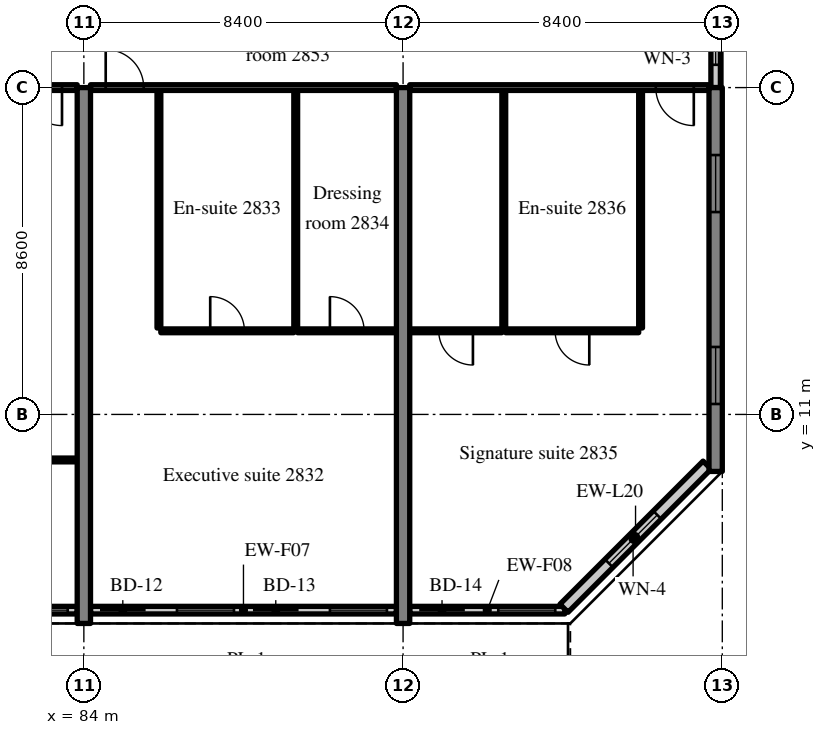
"""IFC4 building model, lengths in metres.
Left out: names, types, materials, properties, quantities, classifications, styles, units other than length and angle.
Written with IfcOpenShell. Run it as: python <this file> out.ifc"""

import sys

from ifc_helpers import new_model, si_unit, direction, frame, frame_2d, origin, place, context, subcontext, project, spatial, rectangle, extrude, source, transform, mapped, element, fill, save


model = new_model("IFC4")
c1 = context("Model", 3, precision=1e-05, world=origin(), true_north=direction((0.0, 1.0)))
c2 = subcontext(c1, "Body", "Model", "MODEL_VIEW")
j1 = project(units=[si_unit("LENGTHUNIT", "METRE"), si_unit("PLANEANGLEUNIT", "RADIAN")], contexts=[c1])
p1 = place(None, origin())
s1 = spatial("IfcSite", under=j1, at=p1, CompositionType="ELEMENT")
p2 = place(p1, origin())
s2 = spatial("IfcBuilding", under=s1, at=p2, CompositionType="ELEMENT")
p3 = place(p2, frame((0.0, 0.0, 118.0)))
s3 = spatial("IfcBuildingStorey", under=s2, at=p3, CompositionType="ELEMENT", Elevation=118.0)
m1 = source(origin(), c2, "Body", "SweptSolid", [
    extrude(rectangle(XDim=14.1, YDim=0.35, at=frame_2d((7.05, 0.0))), origin(), (0.0, 0.0, 1.0), 3.52),
])
for number, where, z_axis, x_axis in (
    (1, (84.0, 5.5, 0.0), (0.0, 0.0, 1.0), (0.0, 1.0, 0.0)),
    (2, (92.4, 5.5, 0.0), (0.0, 0.0, 1.0), (0.0, 1.0, 0.0)),
):
    element("IfcWall", number, at=place(p3, frame(where, z_axis=z_axis, x_axis=x_axis)), inside=s3, PredefinedType="SHEAR", context=c2, shape_type="MappedRepresentation", body=[
        mapped(m1, transform((0.0, 0.0, 0.0), scale=1.0)),
    ])
m2 = source(origin(), c2, "Body", "SweptSolid", [
    extrude(rectangle(XDim=10.1, YDim=0.35, at=frame_2d((5.05, 0.0))), origin(), (0.0, 0.0, 1.0), 3.52),
])
p4 = place(p3, frame((100.625, 9.5, 0.0), z_axis=(0.0, 0.0, 1.0), x_axis=(0.0, 1.0, 0.0)))
e3 = element("IfcWall", 3, at=p4, inside=s3, PredefinedType="SHEAR", context=c2, shape_type="MappedRepresentation", body=[
    mapped(m2, transform((0.0, 0.0, 0.0), scale=1.0)),
])
m3 = source(origin(), c2, "Body", "SweptSolid", [
    extrude(rectangle(XDim=1.5, YDim=1.5, at=frame_2d((0.75, 0.75))), frame((0.0, 0.185, 0.0), z_axis=(0.0, -1.0, 0.0), x_axis=(1.0, 0.0, 0.0)), (0.0, 0.0, 1.0), 0.37),
])
p5 = place(p4, frame((1.775, 0.0, 0.9)))
e4 = element("IfcOpeningElement", 4, at=p5, cuts=e3, PredefinedType="OPENING", context=c2, shape_type="MappedRepresentation", body=[
    mapped(m3, transform((0.0, 0.0, 0.0), scale=1.0)),
])
p6 = place(p4, frame((6.825, 0.0, 0.9)))
e5 = element("IfcOpeningElement", 5, at=p6, cuts=e3, PredefinedType="OPENING", context=c2, shape_type="MappedRepresentation", body=[
    mapped(m3, transform((0.0, 0.0, 0.0), scale=1.0)),
])
m4 = source(origin(), c2, "Body", "SweptSolid", [
    extrude(rectangle(XDim=8.05, YDim=0.2, at=frame_2d((4.025, 0.0))), origin(), (0.0, 0.0, 1.0), 2.82),
])
p7 = place(p3, frame((75.775, 5.85, 0.0), z_axis=(0.0, 0.0, 1.0), x_axis=(1.0, 0.0, 0.0)))
e6 = element("IfcWall", 6, at=p7, inside=s3, PredefinedType="SOLIDWALL", context=c2, shape_type="MappedRepresentation", body=[
    mapped(m4, transform((0.0, 0.0, 0.0), scale=1.0)),
])
m5 = source(origin(), c2, "Body", "SweptSolid", [
    extrude(rectangle(XDim=1.2, YDim=2.4, at=frame_2d((0.6, 1.2))), frame((0.0, 0.11, 0.0), z_axis=(0.0, -1.0, 0.0), x_axis=(1.0, 0.0, 0.0)), (0.0, 0.0, 1.0), 0.22),
])
p8 = place(p7, frame((0.25, 0.0, 0.0)))
e7 = element("IfcOpeningElement", 7, at=p8, cuts=e6, PredefinedType="OPENING", context=c2, shape_type="MappedRepresentation", body=[
    mapped(m5, transform((0.0, 0.0, 0.0), scale=1.0)),
])
m6 = source(origin(), c2, "Body", "SweptSolid", [
    extrude(rectangle(XDim=1.5, YDim=1.5, at=frame_2d((0.75, 0.75))), frame((0.0, 0.11, 0.0), z_axis=(0.0, -1.0, 0.0), x_axis=(1.0, 0.0, 0.0)), (0.0, 0.0, 1.0), 0.22),
])
p9 = place(p7, frame((2.275, 0.0, 0.9)))
e8 = element("IfcOpeningElement", 8, at=p9, cuts=e6, PredefinedType="OPENING", context=c2, shape_type="MappedRepresentation", body=[
    mapped(m6, transform((0.0, 0.0, 0.0), scale=1.0)),
])
p10 = place(p7, frame((4.275, 0.0, 0.0)))
e9 = element("IfcOpeningElement", 9, at=p10, cuts=e6, PredefinedType="OPENING", context=c2, shape_type="MappedRepresentation", body=[
    mapped(m5, transform((0.0, 0.0, 0.0), scale=1.0)),
])
p11 = place(p7, frame((6.3, 0.0, 0.9)))
e10 = element("IfcOpeningElement", 10, at=p11, cuts=e6, PredefinedType="OPENING", context=c2, shape_type="MappedRepresentation", body=[
    mapped(m6, transform((0.0, 0.0, 0.0), scale=1.0)),
])
p12 = place(p3, frame((84.175, 5.85, 0.0), z_axis=(0.0, 0.0, 1.0), x_axis=(1.0, 0.0, 0.0)))
e11 = element("IfcWall", 11, at=p12, inside=s3, PredefinedType="SOLIDWALL", context=c2, shape_type="MappedRepresentation", body=[
    mapped(m4, transform((0.0, 0.0, 0.0), scale=1.0)),
])
p13 = place(p12, frame((0.25, 0.0, 0.0)))
e12 = element("IfcOpeningElement", 12, at=p13, cuts=e11, PredefinedType="OPENING", context=c2, shape_type="MappedRepresentation", body=[
    mapped(m5, transform((0.0, 0.0, 0.0), scale=1.0)),
])
p14 = place(p12, frame((2.275, 0.0, 0.9)))
e13 = element("IfcOpeningElement", 13, at=p14, cuts=e11, PredefinedType="OPENING", context=c2, shape_type="MappedRepresentation", body=[
    mapped(m6, transform((0.0, 0.0, 0.0), scale=1.0)),
])
p15 = place(p12, frame((4.275, 0.0, 0.0)))
e14 = element("IfcOpeningElement", 14, at=p15, cuts=e11, PredefinedType="OPENING", context=c2, shape_type="MappedRepresentation", body=[
    mapped(m5, transform((0.0, 0.0, 0.0), scale=1.0)),
])
p16 = place(p12, frame((6.3, 0.0, 0.9)))
e15 = element("IfcOpeningElement", 15, at=p16, cuts=e11, PredefinedType="OPENING", context=c2, shape_type="MappedRepresentation", body=[
    mapped(m6, transform((0.0, 0.0, 0.0), scale=1.0)),
])
m7 = source(origin(), c2, "Body", "SweptSolid", [
    extrude(rectangle(XDim=4.08, YDim=0.2, at=frame_2d((2.04, 0.0))), origin(), (0.0, 0.0, 1.0), 2.82),
])
p17 = place(p3, frame((92.575, 5.85, 0.0), z_axis=(0.0, 0.0, 1.0), x_axis=(1.0, 0.0, 0.0)))
e16 = element("IfcWall", 16, at=p17, inside=s3, PredefinedType="SOLIDWALL", context=c2, shape_type="MappedRepresentation", body=[
    mapped(m7, transform((0.0, 0.0, 0.0), scale=1.0)),
])
p18 = place(p17, frame((0.25, 0.0, 0.0)))
e17 = element("IfcOpeningElement", 17, at=p18, cuts=e16, PredefinedType="OPENING", context=c2, shape_type="MappedRepresentation", body=[
    mapped(m5, transform((0.0, 0.0, 0.0), scale=1.0)),
])
p19 = place(p17, frame((2.33, 0.0, 0.9)))
e18 = element("IfcOpeningElement", 18, at=p19, cuts=e16, PredefinedType="OPENING", context=c2, shape_type="MappedRepresentation", body=[
    mapped(m6, transform((0.0, 0.0, 0.0), scale=1.0)),
])
m8 = source(origin(), c2, "Body", "SweptSolid", [
    extrude(rectangle(XDim=5.326, YDim=0.3, at=frame_2d((2.663, 0.0))), origin(), (0.0, 0.0, 1.0), 3.52),
])
p20 = place(p3, frame((96.634, 5.9, 0.0), z_axis=(0.0, 0.0, 1.0), x_axis=(0.707083859269, 0.707129702361, 0.0)))
e19 = element("IfcWall", 19, at=p20, inside=s3, PredefinedType="SOLIDWALL", context=c2, shape_type="MappedRepresentation", body=[
    mapped(m8, transform((0.0, 0.0, 0.0), scale=1.0)),
])
m9 = source(origin(), c2, "Body", "SweptSolid", [
    extrude(rectangle(XDim=1.8, YDim=1.5, at=frame_2d((0.9, 0.75))), frame((0.0, 0.16, 0.0), z_axis=(0.0, -1.0, 0.0), x_axis=(1.0, 0.0, 0.0)), (0.0, 0.0, 1.0), 0.32),
])
p21 = place(p20, frame((1.672, 0.0, 0.9)))
e20 = element("IfcOpeningElement", 20, at=p21, cuts=e19, PredefinedType="OPENING", context=c2, shape_type="MappedRepresentation", body=[
    mapped(m9, transform((0.0, 0.0, 0.0), scale=1.0)),
])
m10 = source(origin(), c2, "Body", "SweptSolid", [
    extrude(rectangle(XDim=2.4, YDim=0.25, at=frame_2d((1.2, 0.0))), origin(), (0.0, 0.0, 1.0), 2.62),
])
p22 = place(p3, frame((100.625, 19.6, 0.0), z_axis=(0.0, 0.0, 1.0), x_axis=(0.0, 1.0, 0.0)))
e21 = element("IfcWall", 21, at=p22, inside=s3, PredefinedType="SOLIDWALL", context=c2, shape_type="MappedRepresentation", body=[
    mapped(m10, transform((0.0, 0.0, 0.0), scale=1.0)),
])
m11 = source(origin(), c2, "Body", "SweptSolid", [
    extrude(rectangle(XDim=1.2, YDim=1.5, at=frame_2d((0.6, 0.75))), frame((0.0, 0.135, 0.0), z_axis=(0.0, -1.0, 0.0), x_axis=(1.0, 0.0, 0.0)), (0.0, 0.0, 1.0), 0.27),
])
p23 = place(p22, frame((0.6, 0.0, 0.9)))
e22 = element("IfcOpeningElement", 22, at=p23, cuts=e21, PredefinedType="OPENING", context=c2, shape_type="MappedRepresentation", body=[
    mapped(m11, transform((0.0, 0.0, 0.0), scale=1.0)),
])
m12 = source(origin(), c2, "Body", "SweptSolid", [
    extrude(rectangle(XDim=8.05, YDim=0.1, at=frame_2d((4.025, 0.0))), origin(), (0.0, 0.0, 1.0), 3.52),
])
p24 = place(p3, frame((75.775, 9.802, 0.0), z_axis=(0.0, 0.0, 1.0), x_axis=(1.0, 0.0, 0.0)))
e23 = element("IfcWall", 23, at=p24, inside=s3, PredefinedType="PARTITIONING", context=c2, shape_type="MappedRepresentation", body=[
    mapped(m12, transform((0.0, 0.0, 0.0), scale=1.0)),
])
m13 = source(origin(), c2, "Body", "SweptSolid", [
    extrude(rectangle(XDim=1.8, YDim=2.1, at=frame_2d((0.9, 1.05))), frame((0.0, 0.06, 0.0), z_axis=(0.0, -1.0, 0.0), x_axis=(1.0, 0.0, 0.0)), (0.0, 0.0, 1.0), 0.12),
])
p25 = place(p24, frame((3.125, 0.0, 0.0)))
e24 = element("IfcOpeningElement", 24, at=p25, cuts=e23, PredefinedType="OPENING", context=c2, shape_type="MappedRepresentation", body=[
    mapped(m13, transform((0.0, 0.0, 0.0), scale=1.0)),
])
m14 = source(origin(), c2, "Body", "SweptSolid", [
    extrude(rectangle(XDim=8.05, YDim=0.15, at=frame_2d((4.025, 0.0))), origin(), (0.0, 0.0, 1.0), 2.82),
])
p26 = place(p3, frame((75.775, 19.6, 0.0), z_axis=(0.0, 0.0, 1.0), x_axis=(1.0, 0.0, 0.0)))
e25 = element("IfcWall", 25, at=p26, inside=s3, PredefinedType="PARTITIONING", context=c2, shape_type="MappedRepresentation", body=[
    mapped(m14, transform((0.0, 0.0, 0.0), scale=1.0)),
])
m15 = source(origin(), c2, "Body", "SweptSolid", [
    extrude(rectangle(XDim=1.0, YDim=2.1, at=frame_2d((0.5, 1.05))), frame((0.0, 0.085, 0.0), z_axis=(0.0, -1.0, 0.0), x_axis=(1.0, 0.0, 0.0)), (0.0, 0.0, 1.0), 0.17),
])
p27 = place(p26, frame((6.65, 0.0, 0.0)))
e26 = element("IfcOpeningElement", 26, at=p27, cuts=e25, PredefinedType="OPENING", context=c2, shape_type="MappedRepresentation", body=[
    mapped(m15, transform((0.0, 0.0, 0.0), scale=1.0)),
])
m16 = source(origin(), c2, "Body", "SweptSolid", [
    extrude(rectangle(XDim=6.25, YDim=0.1, at=frame_2d((3.125, 0.0))), origin(), (0.0, 0.0, 1.0), 3.52),
])
for number, where, z_axis, x_axis in (
    (27, (85.975, 13.275, 0.0), (0.0, 0.0, 1.0), (0.0, 1.0, 0.0)),
    (28, (89.575, 13.275, 0.0), (0.0, 0.0, 1.0), (0.0, 1.0, 0.0)),
):
    element("IfcWall", number, at=place(p3, frame(where, z_axis=z_axis, x_axis=x_axis)), inside=s3, PredefinedType="PARTITIONING", context=c2, shape_type="MappedRepresentation", body=[
        mapped(m16, transform((0.0, 0.0, 0.0), scale=1.0)),
    ])
m17 = source(origin(), c2, "Body", "SweptSolid", [
    extrude(rectangle(XDim=3.5, YDim=0.1, at=frame_2d((1.75, 0.0))), origin(), (0.0, 0.0, 1.0), 3.52),
])
p28 = place(p3, frame((86.025, 13.2, 0.0), z_axis=(0.0, 0.0, 1.0), x_axis=(1.0, 0.0, 0.0)))
e29 = element("IfcWall", 29, at=p28, inside=s3, PredefinedType="PARTITIONING", context=c2, shape_type="MappedRepresentation", body=[
    mapped(m17, transform((0.0, 0.0, 0.0), scale=1.0)),
])
m18 = source(origin(), c2, "Body", "SweptSolid", [
    extrude(rectangle(XDim=0.9, YDim=2.1, at=frame_2d((0.45, 1.05))), frame((0.0, 0.06, 0.0), z_axis=(0.0, -1.0, 0.0), x_axis=(1.0, 0.0, 0.0)), (0.0, 0.0, 1.0), 0.12),
])
p29 = place(p28, frame((1.3, 0.0, 0.0)))
e30 = element("IfcOpeningElement", 30, at=p29, cuts=e29, PredefinedType="OPENING", context=c2, shape_type="MappedRepresentation", body=[
    mapped(m18, transform((0.0, 0.0, 0.0), scale=1.0)),
])
m19 = source(origin(), c2, "Body", "SweptSolid", [
    extrude(rectangle(XDim=2.6, YDim=0.1, at=frame_2d((1.3, 0.0))), origin(), (0.0, 0.0, 1.0), 3.52),
])
p30 = place(p3, frame((89.625, 13.2, 0.0), z_axis=(0.0, 0.0, 1.0), x_axis=(1.0, 0.0, 0.0)))
e31 = element("IfcWall", 31, at=p30, inside=s3, PredefinedType="PARTITIONING", context=c2, shape_type="MappedRepresentation", body=[
    mapped(m19, transform((0.0, 0.0, 0.0), scale=1.0)),
])
p31 = place(p30, frame((0.85, 0.0, 0.0)))
e32 = element("IfcOpeningElement", 32, at=p31, cuts=e31, PredefinedType="OPENING", context=c2, shape_type="MappedRepresentation", body=[
    mapped(m18, transform((0.0, 0.0, 0.0), scale=1.0)),
])
p32 = place(p3, frame((84.175, 19.6, 0.0), z_axis=(0.0, 0.0, 1.0), x_axis=(1.0, 0.0, 0.0)))
e33 = element("IfcWall", 33, at=p32, inside=s3, PredefinedType="PARTITIONING", context=c2, shape_type="MappedRepresentation", body=[
    mapped(m14, transform((0.0, 0.0, 0.0), scale=1.0)),
])
p33 = place(p32, frame((0.4, 0.0, 0.0)))
e34 = element("IfcOpeningElement", 34, at=p33, cuts=e33, PredefinedType="OPENING", context=c2, shape_type="MappedRepresentation", body=[
    mapped(m15, transform((0.0, 0.0, 0.0), scale=1.0)),
])
for number, where, z_axis, x_axis in (
    (35, (98.65, 13.275, 0.0), (0.0, 0.0, 1.0), (0.0, 1.0, 0.0)),
    (36, (95.05, 13.275, 0.0), (0.0, 0.0, 1.0), (0.0, 1.0, 0.0)),
):
    element("IfcWall", number, at=place(p3, frame(where, z_axis=z_axis, x_axis=x_axis)), inside=s3, PredefinedType="PARTITIONING", context=c2, shape_type="MappedRepresentation", body=[
        mapped(m16, transform((0.0, 0.0, 0.0), scale=1.0)),
    ])
p34 = place(p3, frame((95.1, 13.2, 0.0), z_axis=(0.0, 0.0, 1.0), x_axis=(1.0, 0.0, 0.0)))
e37 = element("IfcWall", 37, at=p34, inside=s3, PredefinedType="PARTITIONING", context=c2, shape_type="MappedRepresentation", body=[
    mapped(m17, transform((0.0, 0.0, 0.0), scale=1.0)),
])
p35 = place(p34, frame((1.3, 0.0, 0.0)))
e38 = element("IfcOpeningElement", 38, at=p35, cuts=e37, PredefinedType="OPENING", context=c2, shape_type="MappedRepresentation", body=[
    mapped(m18, transform((0.0, 0.0, 0.0), scale=1.0)),
])
m20 = source(origin(), c2, "Body", "SweptSolid", [
    extrude(rectangle(XDim=2.425, YDim=0.1, at=frame_2d((1.212, 0.0))), origin(), (0.0, 0.0, 1.0), 3.52),
])
p36 = place(p3, frame((92.575, 13.2, 0.0), z_axis=(0.0, 0.0, 1.0), x_axis=(1.0, 0.0, 0.0)))
e39 = element("IfcWall", 39, at=p36, inside=s3, PredefinedType="PARTITIONING", context=c2, shape_type="MappedRepresentation", body=[
    mapped(m20, transform((0.0, 0.0, 0.0), scale=1.0)),
])
p37 = place(p36, frame((0.763, 0.0, 0.0)))
e40 = element("IfcOpeningElement", 40, at=p37, cuts=e39, PredefinedType="OPENING", context=c2, shape_type="MappedRepresentation", body=[
    mapped(m18, transform((0.0, 0.0, 0.0), scale=1.0)),
])
m21 = source(origin(), c2, "Body", "SweptSolid", [
    extrude(rectangle(XDim=7.875, YDim=0.15, at=frame_2d((3.938, 0.0))), origin(), (0.0, 0.0, 1.0), 2.82),
])
p38 = place(p3, frame((92.575, 19.6, 0.0), z_axis=(0.0, 0.0, 1.0), x_axis=(1.0, 0.0, 0.0)))
e41 = element("IfcWall", 41, at=p38, inside=s3, PredefinedType="PARTITIONING", context=c2, shape_type="MappedRepresentation", body=[
    mapped(m21, transform((0.0, 0.0, 0.0), scale=1.0)),
])
p39 = place(p38, frame((6.475, 0.0, 0.0)))
e42 = element("IfcOpeningElement", 42, at=p39, cuts=e41, PredefinedType="OPENING", context=c2, shape_type="MappedRepresentation", body=[
    mapped(m15, transform((0.0, 0.0, 0.0), scale=1.0)),
])
m22 = source(origin(), c2, "Body", "SweptSolid", [
    extrude(rectangle(XDim=1.5, YDim=1.5, at=frame_2d((0.75, 0.75))), frame((0.0, 0.03, 0.0), z_axis=(0.0, -1.0, 0.0), x_axis=(1.0, 0.0, 0.0)), (0.0, 0.0, 1.0), 0.06),
])
p40 = place(p11, origin())
e43 = element("IfcWindow", 43, at=p40, inside=s3, PartitioningType="SINGLE_PANEL", PredefinedType="WINDOW", context=c2, shape_type="MappedRepresentation", body=[
    mapped(m22, transform((0.0, 0.0, 0.0), scale=1.0)),
])
fill(e10, e43)
m23 = source(origin(), c2, "Body", "SweptSolid", [
    extrude(rectangle(XDim=1.2, YDim=2.4, at=frame_2d((0.6, 1.2))), frame((0.0, 0.025, 0.0), z_axis=(0.0, -1.0, 0.0), x_axis=(1.0, 0.0, 0.0)), (0.0, 0.0, 1.0), 0.05),
])
p41 = place(p13, origin())
e44 = element("IfcDoor", 44, at=p41, inside=s3, OperationType="SLIDING_TO_RIGHT", PredefinedType="DOOR", context=c2, shape_type="MappedRepresentation", body=[
    mapped(m23, transform((0.0, 0.0, 0.0), scale=1.0)),
])
fill(e12, e44)
p42 = place(p14, origin())
e45 = element("IfcWindow", 45, at=p42, inside=s3, PartitioningType="SINGLE_PANEL", PredefinedType="WINDOW", context=c2, shape_type="MappedRepresentation", body=[
    mapped(m22, transform((0.0, 0.0, 0.0), scale=1.0)),
])
fill(e13, e45)
p43 = place(p15, origin())
e46 = element("IfcDoor", 46, at=p43, inside=s3, OperationType="SLIDING_TO_LEFT", PredefinedType="DOOR", context=c2, shape_type="MappedRepresentation", body=[
    mapped(m23, transform((0.0, 0.0, 0.0), scale=1.0)),
])
fill(e14, e46)
p44 = place(p16, origin())
e47 = element("IfcWindow", 47, at=p44, inside=s3, PartitioningType="SINGLE_PANEL", PredefinedType="WINDOW", context=c2, shape_type="MappedRepresentation", body=[
    mapped(m22, transform((0.0, 0.0, 0.0), scale=1.0)),
])
fill(e15, e47)
p45 = place(p18, origin())
e48 = element("IfcDoor", 48, at=p45, inside=s3, OperationType="SLIDING_TO_RIGHT", PredefinedType="DOOR", context=c2, shape_type="MappedRepresentation", body=[
    mapped(m23, transform((0.0, 0.0, 0.0), scale=1.0)),
])
fill(e17, e48)
p46 = place(p19, origin())
e49 = element("IfcWindow", 49, at=p46, inside=s3, PartitioningType="SINGLE_PANEL", PredefinedType="WINDOW", context=c2, shape_type="MappedRepresentation", body=[
    mapped(m22, transform((0.0, 0.0, 0.0), scale=1.0)),
])
fill(e18, e49)
m24 = source(origin(), c2, "Body", "SweptSolid", [
    extrude(rectangle(XDim=1.8, YDim=1.5, at=frame_2d((0.9, 0.75))), frame((0.0, 0.03, 0.0), z_axis=(0.0, -1.0, 0.0), x_axis=(1.0, 0.0, 0.0)), (0.0, 0.0, 1.0), 0.06),
])
p47 = place(p21, origin())
e50 = element("IfcWindow", 50, at=p47, inside=s3, PartitioningType="SINGLE_PANEL", PredefinedType="WINDOW", context=c2, shape_type="MappedRepresentation", body=[
    mapped(m24, transform((0.0, 0.0, 0.0), scale=1.0)),
])
fill(e20, e50)
p48 = place(p5, origin())
e51 = element("IfcWindow", 51, at=p48, inside=s3, PartitioningType="SINGLE_PANEL", PredefinedType="WINDOW", context=c2, shape_type="MappedRepresentation", body=[
    mapped(m22, transform((0.0, 0.0, 0.0), scale=1.0)),
])
fill(e4, e51)
p49 = place(p6, origin())
e52 = element("IfcWindow", 52, at=p49, inside=s3, PartitioningType="SINGLE_PANEL", PredefinedType="WINDOW", context=c2, shape_type="MappedRepresentation", body=[
    mapped(m22, transform((0.0, 0.0, 0.0), scale=1.0)),
])
fill(e5, e52)
m25 = source(origin(), c2, "Body", "SweptSolid", [
    extrude(rectangle(XDim=1.2, YDim=1.5, at=frame_2d((0.6, 0.75))), frame((0.0, 0.03, 0.0), z_axis=(0.0, -1.0, 0.0), x_axis=(1.0, 0.0, 0.0)), (0.0, 0.0, 1.0), 0.06),
])
p50 = place(p23, origin())
e53 = element("IfcWindow", 53, at=p50, inside=s3, PartitioningType="SINGLE_PANEL", PredefinedType="WINDOW", context=c2, shape_type="MappedRepresentation", body=[
    mapped(m25, transform((0.0, 0.0, 0.0), scale=1.0)),
])
fill(e22, e53)
m26 = source(origin(), c2, "Body", "SweptSolid", [
    extrude(rectangle(XDim=1.0, YDim=2.1, at=frame_2d((0.5, 1.05))), frame((0.0, 0.025, 0.0), z_axis=(0.0, -1.0, 0.0), x_axis=(1.0, 0.0, 0.0)), (0.0, 0.0, 1.0), 0.05),
])
p51 = place(p27, origin())
e54 = element("IfcDoor", 54, at=p51, inside=s3, OperationType="SINGLE_SWING_RIGHT", PredefinedType="DOOR", context=c2, shape_type="MappedRepresentation", body=[
    mapped(m26, transform((0.0, 0.0, 0.0), scale=1.0)),
])
fill(e26, e54)
m27 = source(origin(), c2, "Body", "SweptSolid", [
    extrude(rectangle(XDim=0.9, YDim=2.1, at=frame_2d((0.45, 1.05))), frame((0.0, 0.025, 0.0), z_axis=(0.0, -1.0, 0.0), x_axis=(1.0, 0.0, 0.0)), (0.0, 0.0, 1.0), 0.05),
])
p52 = place(p29, origin())
e55 = element("IfcDoor", 55, at=p52, inside=s3, OperationType="SINGLE_SWING_LEFT", PredefinedType="DOOR", context=c2, shape_type="MappedRepresentation", body=[
    mapped(m27, transform((0.0, 0.0, 0.0), scale=1.0)),
])
fill(e30, e55)
p53 = place(p31, origin())
e56 = element("IfcDoor", 56, at=p53, inside=s3, OperationType="SINGLE_SWING_LEFT", PredefinedType="DOOR", context=c2, shape_type="MappedRepresentation", body=[
    mapped(m27, transform((0.0, 0.0, 0.0), scale=1.0)),
])
fill(e32, e56)
p54 = place(p33, origin())
e57 = element("IfcDoor", 57, at=p54, inside=s3, OperationType="SINGLE_SWING_LEFT", PredefinedType="DOOR", context=c2, shape_type="MappedRepresentation", body=[
    mapped(m26, transform((0.0, 0.0, 0.0), scale=1.0)),
])
fill(e34, e57)
p55 = place(p35, origin())
e58 = element("IfcDoor", 58, at=p55, inside=s3, OperationType="SINGLE_SWING_RIGHT", PredefinedType="DOOR", context=c2, shape_type="MappedRepresentation", body=[
    mapped(m27, transform((0.0, 0.0, 0.0), scale=1.0)),
])
fill(e38, e58)
p56 = place(p37, origin())
e59 = element("IfcDoor", 59, at=p56, inside=s3, OperationType="SINGLE_SWING_RIGHT", PredefinedType="DOOR", context=c2, shape_type="MappedRepresentation", body=[
    mapped(m27, transform((0.0, 0.0, 0.0), scale=1.0)),
])
fill(e40, e59)
p57 = place(p39, origin())
e60 = element("IfcDoor", 60, at=p57, inside=s3, OperationType="SINGLE_SWING_RIGHT", PredefinedType="DOOR", context=c2, shape_type="MappedRepresentation", body=[
    mapped(m26, transform((0.0, 0.0, 0.0), scale=1.0)),
])
fill(e42, e60)
save(model, sys.argv[1])
